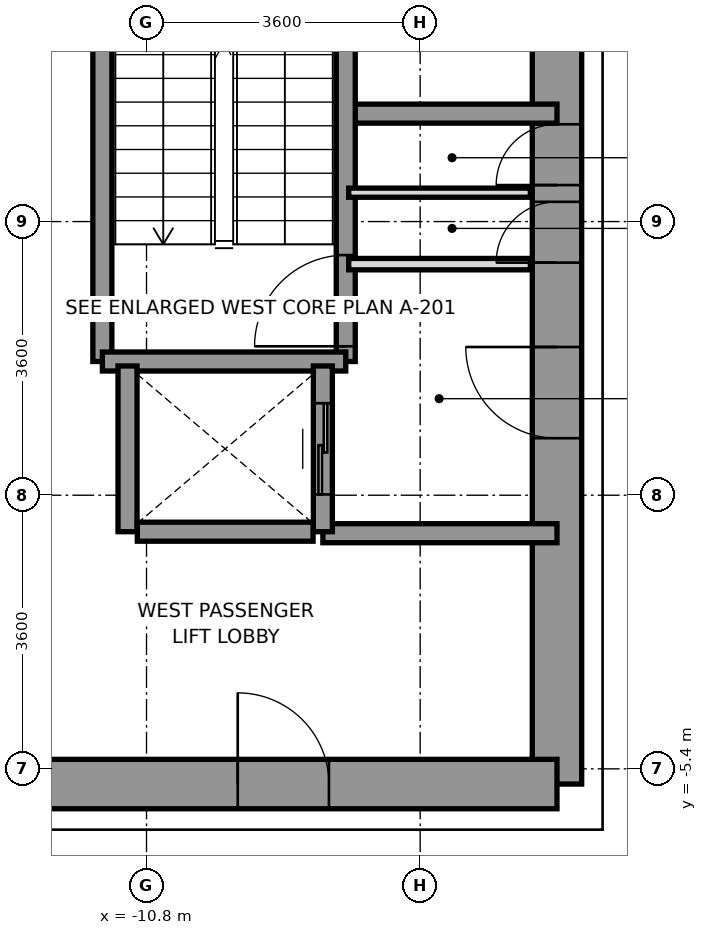
"""IFC4 building model, lengths in metres.
Left out: names, types, materials, properties, quantities, classifications, styles, units other than length and angle.
Written with IfcOpenShell. Run it as: python <this file> out.ifc"""

import sys

from ifc_helpers import new_model, si_unit, direction, frame, frame_2d, origin, place, context, subcontext, project, spatial, rectangle, extrude, source, transform, mapped, element, fill, save


model = new_model("IFC4")
c1 = context("Model", 3, precision=1e-05, world=origin(), true_north=direction((0.0, 1.0)))
c2 = subcontext(c1, "Body", "Model", "MODEL_VIEW")
j1 = project(units=[si_unit("LENGTHUNIT", "METRE"), si_unit("PLANEANGLEUNIT", "RADIAN")], contexts=[c1])
p1 = place(None, origin())
s1 = spatial("IfcSite", under=j1, at=p1, CompositionType="ELEMENT")
p2 = place(p1, origin())
s2 = spatial("IfcBuilding", under=s1, at=p2, CompositionType="ELEMENT")
p3 = place(p2, frame((0.0, 0.0, -4.2)))
s3 = spatial("IfcBuildingStorey", under=s2, at=p3, CompositionType="ELEMENT", Elevation=-4.2)
p4 = place(p3, frame((-5.4, -5.6, 0.0), z_axis=(0.0, 0.0, 1.0), x_axis=(0.0, 1.0, 0.0)))
e1 = element("IfcWall", 1, at=p4, inside=s3, PredefinedType="SHEAR", context=c2, shape_type="SweptSolid", body=[
    extrude(rectangle(XDim=12.5, YDim=0.65, at=frame_2d((6.25, 0.0))), origin(), (0.0, 0.0, 1.0), 3.95),
])
p5 = place(p4, frame((4.55, 0.0, 0.0)))
e2 = element("IfcOpeningElement", 2, at=p5, cuts=e1, PredefinedType="OPENING", context=c2, shape_type="SweptSolid", body=[
    extrude(rectangle(XDim=1.2, YDim=2.2, at=frame_2d((0.6, 1.1))), frame((0.0, 0.335, 0.0), z_axis=(0.0, -1.0, 0.0), x_axis=(1.0, 0.0, 0.0)), (0.0, 0.0, 1.0), 0.67),
])
p6 = place(p4, frame((6.86, 0.0, 0.0)))
e3 = element("IfcOpeningElement", 3, at=p6, cuts=e1, PredefinedType="OPENING", context=c2, shape_type="SweptSolid", body=[
    extrude(rectangle(XDim=0.8, YDim=2.1, at=frame_2d((0.4, 1.05))), frame((0.0, 0.335, 0.0), z_axis=(0.0, -1.0, 0.0), x_axis=(1.0, 0.0, 0.0)), (0.0, 0.0, 1.0), 0.67),
])
p7 = place(p4, frame((7.88, 0.0, 0.0)))
e4 = element("IfcOpeningElement", 4, at=p7, cuts=e1, PredefinedType="OPENING", context=c2, shape_type="SweptSolid", body=[
    extrude(rectangle(XDim=0.8, YDim=2.1, at=frame_2d((0.4, 1.05))), frame((0.0, 0.335, 0.0), z_axis=(0.0, -1.0, 0.0), x_axis=(1.0, 0.0, 0.0)), (0.0, 0.0, 1.0), 0.67),
])
p8 = place(p3, frame((-13.2, -5.6, 0.0), z_axis=(0.0, 0.0, 1.0), x_axis=(1.0, 0.0, 0.0)))
e5 = element("IfcWall", 5, at=p8, inside=s3, PredefinedType="SHEAR", context=c2, shape_type="SweptSolid", body=[
    extrude(rectangle(XDim=7.8, YDim=0.65, at=frame_2d((3.9, 0.0))), origin(), (0.0, 0.0, 1.0), 3.95),
])
p9 = place(p8, frame((3.6, 0.0, 0.0)))
e6 = element("IfcOpeningElement", 6, at=p9, cuts=e5, PredefinedType="OPENING", context=c2, shape_type="SweptSolid", body=[
    extrude(rectangle(XDim=1.2, YDim=2.2, at=frame_2d((0.6, 1.1))), frame((0.0, 0.335, 0.0), z_axis=(0.0, -1.0, 0.0), x_axis=(1.0, 0.0, 0.0)), (0.0, 0.0, 1.0), 0.67),
])
p10 = place(p3, frame((-8.18, 3.22, 0.0), z_axis=(0.0, 0.0, 1.0), x_axis=(1.0, 0.0, 0.0)))
e7 = element("IfcWall", 7, at=p10, inside=s3, PredefinedType="SOLIDWALL", context=c2, shape_type="SweptSolid", body=[
    extrude(rectangle(XDim=2.78, YDim=0.25, at=frame_2d((1.39, 0.0))), origin(), (0.0, 0.0, 1.0), 3.95),
])
p11 = place(p3, frame((-8.48, -2.3, 0.0), z_axis=(0.0, 0.0, 1.0), x_axis=(1.0, 0.0, 0.0)))
e8 = element("IfcWall", 8, at=p11, inside=s3, PredefinedType="SOLIDWALL", context=c2, shape_type="SweptSolid", body=[
    extrude(rectangle(XDim=3.08, YDim=0.25, at=frame_2d((1.54, 0.0))), origin(), (0.0, 0.0, 1.0), 3.95),
])
p12 = place(p3, frame((-8.179, -0.041, 0.0), z_axis=(0.0, 0.0, 1.0), x_axis=(0.0, 1.0, 0.0)))
e9 = element("IfcWall", 9, at=p12, inside=s3, PredefinedType="SOLIDWALL", context=c2, shape_type="SweptSolid", body=[
    extrude(rectangle(XDim=6.941, YDim=0.25, at=frame_2d((3.47, 0.0))), origin(), (0.0, 0.0, 1.0), 3.95),
])
p13 = place(p12, frame((0.2, 0.0, 0.0)))
e10 = element("IfcOpeningElement", 10, at=p13, cuts=e9, PredefinedType="OPENING", context=c2, shape_type="SweptSolid", body=[
    extrude(rectangle(XDim=1.2, YDim=2.2, at=frame_2d((0.6, 1.1))), frame((0.0, 0.135, 0.0), z_axis=(0.0, -1.0, 0.0), x_axis=(1.0, 0.0, 0.0)), (0.0, 0.0, 1.0), 0.27),
])
p14 = place(p3, frame((-11.381, -0.041, 0.0), z_axis=(0.0, 0.0, 1.0), x_axis=(0.0, 1.0, 0.0)))
e11 = element("IfcWall", 11, at=p14, inside=s3, PredefinedType="SOLIDWALL", context=c2, shape_type="SweptSolid", body=[
    extrude(rectangle(XDim=6.941, YDim=0.25, at=frame_2d((3.47, 0.0))), origin(), (0.0, 0.0, 1.0), 3.95),
])
p15 = place(p3, frame((-11.381, -0.041, 0.0), z_axis=(0.0, 0.0, 1.0), x_axis=(1.0, 0.0, 0.0)))
e12 = element("IfcWall", 12, at=p15, inside=s3, PredefinedType="SOLIDWALL", context=c2, shape_type="SweptSolid", body=[
    extrude(rectangle(XDim=3.202, YDim=0.25, at=frame_2d((1.601, 0.0))), origin(), (0.0, 0.0, 1.0), 3.95),
])
p16 = place(p3, frame((-11.05, -2.28, 0.0), z_axis=(0.0, 0.0, 1.0), x_axis=(0.0, 1.0, 0.0)))
e13 = element("IfcWall", 13, at=p16, inside=s3, PredefinedType="SOLIDWALL", context=c2, shape_type="SweptSolid", body=[
    extrude(rectangle(XDim=2.18, YDim=0.25, at=frame_2d((1.09, 0.0))), origin(), (0.0, 0.0, 1.0), 3.95),
])
p17 = place(p3, frame((-8.48, -2.28, 0.0), z_axis=(0.0, 0.0, 1.0), x_axis=(0.0, 1.0, 0.0)))
e14 = element("IfcWall", 14, at=p17, inside=s3, PredefinedType="SOLIDWALL", context=c2, shape_type="SweptSolid", body=[
    extrude(rectangle(XDim=2.18, YDim=0.25, at=frame_2d((1.09, 0.0))), origin(), (0.0, 0.0, 1.0), 3.95),
])
p18 = place(p17, frame((0.49, 0.0, 0.0)))
e15 = element("IfcOpeningElement", 15, at=p18, cuts=e14, PredefinedType="OPENING", context=c2, shape_type="SweptSolid", body=[
    extrude(rectangle(XDim=1.2, YDim=2.2, at=frame_2d((0.6, 1.1))), frame((0.0, 0.135, 0.0), z_axis=(0.0, -1.0, 0.0), x_axis=(1.0, 0.0, 0.0)), (0.0, 0.0, 1.0), 0.27),
])
p19 = place(p3, frame((-10.921, -2.28, 0.0), z_axis=(0.0, 0.0, 1.0), x_axis=(1.0, 0.0, 0.0)))
e16 = element("IfcWall", 16, at=p19, inside=s3, PredefinedType="SOLIDWALL", context=c2, shape_type="SweptSolid", body=[
    extrude(rectangle(XDim=2.312, YDim=0.25, at=frame_2d((1.156, 0.0))), origin(), (0.0, 0.0, 1.0), 3.95),
])
p20 = place(p3, frame((-8.14, 1.24, 0.0), z_axis=(0.0, 0.0, 1.0), x_axis=(1.0, 0.0, 0.0)))
e17 = element("IfcWall", 17, at=p20, inside=s3, PredefinedType="PARTITIONING", context=c2, shape_type="SweptSolid", body=[
    extrude(rectangle(XDim=2.39, YDim=0.15, at=frame_2d((1.195, 0.0))), origin(), (0.0, 0.0, 1.0), 3.05),
])
p21 = place(p3, frame((-8.14, 2.18, 0.0), z_axis=(0.0, 0.0, 1.0), x_axis=(1.0, 0.0, 0.0)))
e18 = element("IfcWall", 18, at=p21, inside=s3, PredefinedType="PARTITIONING", context=c2, shape_type="SweptSolid", body=[
    extrude(rectangle(XDim=2.39, YDim=0.12, at=frame_2d((1.195, 0.0))), origin(), (0.0, 0.0, 1.0), 3.05),
])
m1 = source(origin(), c2, "Body", "SweptSolid", [
    extrude(rectangle(XDim=1.2, YDim=2.2, at=frame_2d((0.6, 1.1))), frame((0.0, 0.025, 0.0), z_axis=(0.0, -1.0, 0.0), x_axis=(1.0, 0.0, 0.0)), (0.0, 0.0, 1.0), 0.05),
])
p22 = place(p13, origin())
e19 = element("IfcDoor", 19, at=p22, inside=s3, OperationType="SINGLE_SWING_LEFT", PredefinedType="DOOR", context=c2, shape_type="MappedRepresentation", body=[
    mapped(m1, transform((0.0, 0.0, 0.0), x_axis=(1.0, 0.0, 0.0), y_axis=(0.0, 1.0, 0.0), z_axis=(0.0, 0.0, 1.0), scale=1.0)),
])
fill(e10, e19)
p23 = place(p5, origin())
e20 = element("IfcDoor", 20, at=p23, inside=s3, OperationType="SINGLE_SWING_RIGHT", PredefinedType="DOOR", context=c2, shape_type="MappedRepresentation", body=[
    mapped(m1, transform((0.0, 0.0, 0.0), x_axis=(1.0, 0.0, 0.0), y_axis=(0.0, 1.0, 0.0), z_axis=(0.0, 0.0, 1.0), scale=1.0)),
])
fill(e2, e20)
p24 = place(p9, origin())
e21 = element("IfcDoor", 21, at=p24, inside=s3, OperationType="SINGLE_SWING_LEFT", PredefinedType="DOOR", context=c2, shape_type="MappedRepresentation", body=[
    mapped(m1, transform((0.0, 0.0, 0.0), x_axis=(1.0, 0.0, 0.0), y_axis=(0.0, 1.0, 0.0), z_axis=(0.0, 0.0, 1.0), scale=1.0)),
])
fill(e6, e21)
m2 = source(origin(), c2, "Body", "SweptSolid", [
    extrude(rectangle(XDim=0.8, YDim=2.1, at=frame_2d((0.4, 1.05))), frame((0.0, 0.025, 0.0), z_axis=(0.0, -1.0, 0.0), x_axis=(1.0, 0.0, 0.0)), (0.0, 0.0, 1.0), 0.05),
])
p25 = place(p6, origin())
e22 = element("IfcDoor", 22, at=p25, inside=s3, OperationType="SINGLE_SWING_LEFT", PredefinedType="DOOR", context=c2, shape_type="MappedRepresentation", body=[
    mapped(m2, transform((0.0, 0.0, 0.0), x_axis=(1.0, 0.0, 0.0), y_axis=(0.0, 1.0, 0.0), z_axis=(0.0, 0.0, 1.0), scale=1.0)),
])
fill(e3, e22)
p26 = place(p7, origin())
e23 = element("IfcDoor", 23, at=p26, inside=s3, OperationType="SINGLE_SWING_LEFT", PredefinedType="DOOR", context=c2, shape_type="MappedRepresentation", body=[
    mapped(m2, transform((0.0, 0.0, 0.0), x_axis=(1.0, 0.0, 0.0), y_axis=(0.0, 1.0, 0.0), z_axis=(0.0, 0.0, 1.0), scale=1.0)),
])
fill(e4, e23)
p27 = place(p18, origin())
e24 = element("IfcDoor", 24, at=p27, inside=s3, OperationType="SLIDING_TO_RIGHT", PredefinedType="DOOR", context=c2, shape_type="MappedRepresentation", body=[
    mapped(m1, transform((0.0, 0.0, 0.0), x_axis=(1.0, 0.0, 0.0), y_axis=(0.0, 1.0, 0.0), z_axis=(0.0, 0.0, 1.0), scale=1.0)),
])
fill(e15, e24)
save(model, sys.argv[1])
